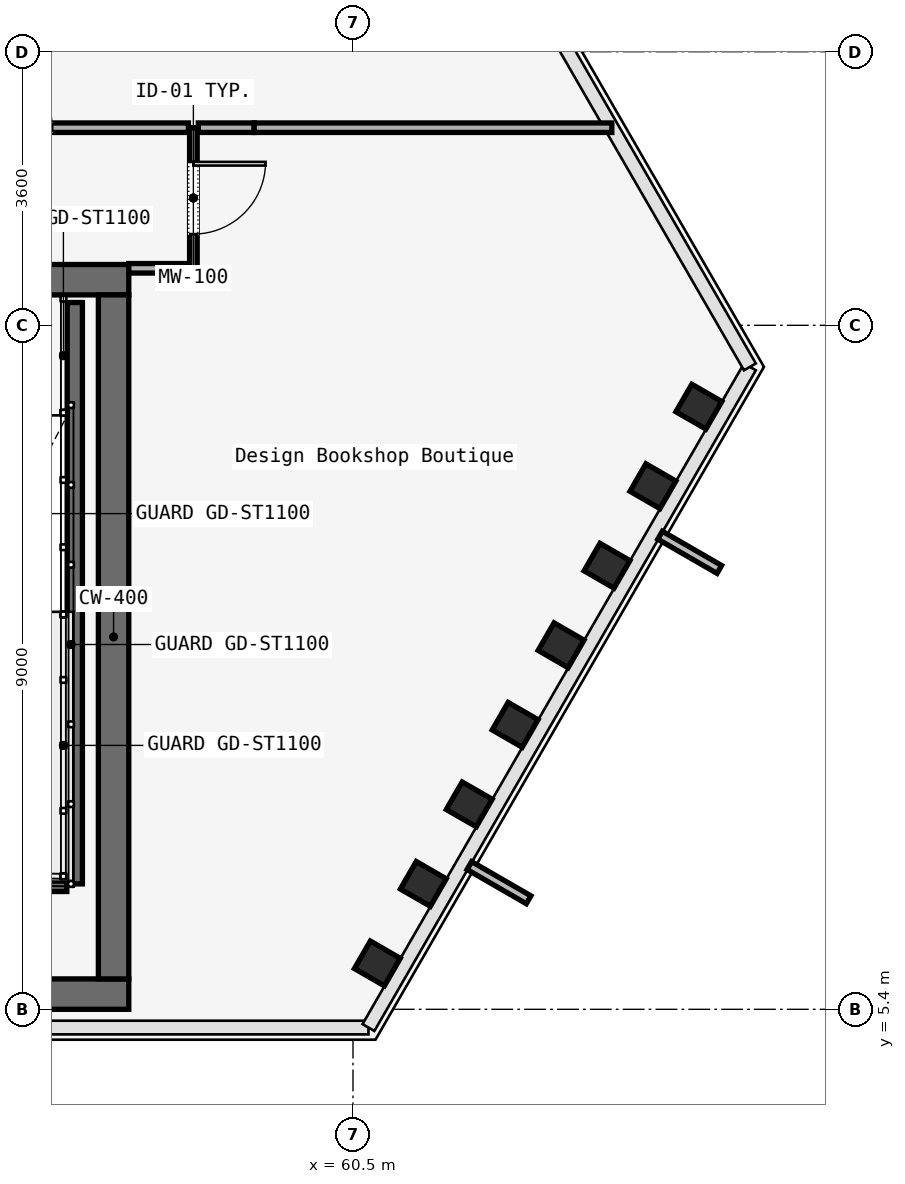
"""IFC4 building model, lengths in metres.
Left out: names, types, materials, properties, quantities, classifications, styles, units other than length and angle.
Written with IfcOpenShell. Run it as: python <this file> out.ifc"""

import sys

from ifc_helpers import new_model, si_unit, direction, frame, frame_2d, origin, origin_2d, place, context, subcontext, project, spatial, rectangle, i_section, extrude, element, fill, save


model = new_model("IFC4")
c1 = context("Model", 3, precision=1e-05, world=origin(), true_north=direction((0.0, 1.0)))
c2 = subcontext(c1, "Body", "Model", "MODEL_VIEW")
j1 = project(units=[si_unit("LENGTHUNIT", "METRE"), si_unit("PLANEANGLEUNIT", "RADIAN")], contexts=[c1])
p1 = place(None, origin())
s1 = spatial("IfcSite", under=j1, at=p1, CompositionType="ELEMENT")
p2 = place(p1, origin())
s2 = spatial("IfcBuilding", under=s1, at=p2, CompositionType="ELEMENT")
p3 = place(p2, frame((0.0, 0.0, 172.6)))
s3 = spatial("IfcBuildingStorey", under=s2, at=p3, CompositionType="ELEMENT", Elevation=172.6)
p4 = place(p3, frame((26.45, 15.0, 0.0), z_axis=(0.0, 0.0, 1.0), x_axis=(1.0, 0.0, 0.0)))
e1 = element("IfcWall", 1, at=p4, inside=s3, PredefinedType="SOLIDWALL", context=c2, shape_type="SweptSolid", body=[
    extrude(rectangle(XDim=31.1, YDim=0.4, at=frame_2d((15.55, 0.0))), origin(), (0.0, 0.0, 1.0), 3.58),
])
p5 = place(p4, frame((1.65, 0.0, 0.0)))
e2 = element("IfcOpeningElement", 2, at=p5, cuts=e1, PredefinedType="OPENING", context=c2, shape_type="SweptSolid", body=[
    extrude(rectangle(XDim=1.1, YDim=2.2, at=frame_2d((0.55, 1.1))), frame((0.0, 0.2, 0.0), z_axis=(0.0, -1.0, 0.0), x_axis=(1.0, 0.0, 0.0)), (0.0, 0.0, 1.0), 0.4),
])
p6 = place(p4, frame((13.65, 0.0, 0.0)))
e3 = element("IfcOpeningElement", 3, at=p6, cuts=e1, PredefinedType="OPENING", context=c2, shape_type="SweptSolid", body=[
    extrude(rectangle(XDim=1.1, YDim=2.2, at=frame_2d((0.55, 1.1))), frame((0.0, 0.2, 0.0), z_axis=(0.0, -1.0, 0.0), x_axis=(1.0, 0.0, 0.0)), (0.0, 0.0, 1.0), 0.4),
])
p7 = place(p4, frame((25.55, 0.0, 0.0)))
e4 = element("IfcOpeningElement", 4, at=p7, cuts=e1, PredefinedType="OPENING", context=c2, shape_type="SweptSolid", body=[
    extrude(rectangle(XDim=1.1, YDim=2.2, at=frame_2d((0.55, 1.1))), frame((0.0, 0.2, 0.0), z_axis=(0.0, -1.0, 0.0), x_axis=(1.0, 0.0, 0.0)), (0.0, 0.0, 1.0), 0.4),
])
p8 = place(p4, frame((10.7, 0.0, 0.0)))
e5 = element("IfcOpeningElement", 5, at=p8, cuts=e1, PredefinedType="OPENING", context=c2, shape_type="SweptSolid", body=[
    extrude(rectangle(XDim=1.4, YDim=2.2, at=frame_2d((0.7, 1.1))), frame((0.0, 0.2, 0.0), z_axis=(0.0, -1.0, 0.0), x_axis=(1.0, 0.0, 0.0)), (0.0, 0.0, 1.0), 0.4),
])
p9 = place(p4, frame((19.35, 0.0, 0.0)))
e6 = element("IfcOpeningElement", 6, at=p9, cuts=e1, PredefinedType="OPENING", context=c2, shape_type="SweptSolid", body=[
    extrude(rectangle(XDim=1.1, YDim=2.2, at=frame_2d((0.55, 1.1))), frame((0.0, 0.2, 0.0), z_axis=(0.0, -1.0, 0.0), x_axis=(1.0, 0.0, 0.0)), (0.0, 0.0, 1.0), 0.4),
])
p10 = place(p4, frame((21.4, 0.0, 0.0)))
e7 = element("IfcOpeningElement", 7, at=p10, cuts=e1, PredefinedType="OPENING", context=c2, shape_type="SweptSolid", body=[
    extrude(rectangle(XDim=0.9, YDim=2.1, at=frame_2d((0.45, 1.05))), frame((0.0, 0.2, 0.0), z_axis=(0.0, -1.0, 0.0), x_axis=(1.0, 0.0, 0.0)), (0.0, 0.0, 1.0), 0.4),
])
p11 = place(p4, frame((23.35, 0.0, 0.0)))
e8 = element("IfcOpeningElement", 8, at=p11, cuts=e1, PredefinedType="OPENING", context=c2, shape_type="SweptSolid", body=[
    extrude(rectangle(XDim=1.3, YDim=2.3, at=frame_2d((0.65, 1.15))), frame((0.0, 0.2, 0.0), z_axis=(0.0, -1.0, 0.0), x_axis=(1.0, 0.0, 0.0)), (0.0, 0.0, 1.0), 0.4),
])
p12 = place(p3, frame((26.45, 5.6, 0.0), z_axis=(0.0, 0.0, 1.0), x_axis=(1.0, 0.0, 0.0)))
e9 = element("IfcWall", 9, at=p12, inside=s3, PredefinedType="SOLIDWALL", context=c2, shape_type="SweptSolid", body=[
    extrude(rectangle(XDim=31.1, YDim=0.4, at=frame_2d((15.55, 0.0))), origin(), (0.0, 0.0, 1.0), 3.58),
])
p13 = place(p3, frame((57.35, 5.8, 0.0), z_axis=(0.0, 0.0, 1.0), x_axis=(0.0, 1.0, 0.0)))
e10 = element("IfcWall", 10, at=p13, inside=s3, PredefinedType="SOLIDWALL", context=c2, shape_type="SweptSolid", body=[
    extrude(rectangle(XDim=9.0, YDim=0.4, at=frame_2d((4.5, 0.0))), origin(), (0.0, 0.0, 1.0), 3.58),
])
for number, where, z_axis, x_axis in (
    (11, (60.821, 6.003, 0.0), (0.0, 0.0, 1.0), (0.5, 0.866, 0.0)),
    (12, (61.425, 7.05, 0.0), (0.0, 0.0, 1.0), (0.5, 0.866, 0.0)),
    (13, (62.029, 8.096, 0.0), (0.0, 0.0, 1.0), (0.5, 0.866, 0.0)),
    (14, (62.634, 9.143, 0.0), (0.0, 0.0, 1.0), (0.5, 0.866, 0.0)),
    (15, (63.238, 10.19, 0.0), (0.0, 0.0, 1.0), (0.5, 0.866, 0.0)),
    (16, (63.842, 11.236, 0.0), (0.0, 0.0, 1.0), (0.5, 0.866, 0.0)),
    (17, (64.446, 12.283, 0.0), (0.0, 0.0, 1.0), (0.5, 0.866, 0.0)),
    (18, (65.051, 13.33, 0.0), (0.0, 0.0, 1.0), (0.5, 0.866, 0.0)),
):
    element("IfcColumn", number, at=place(p3, frame(where, z_axis=z_axis, x_axis=x_axis)), inside=s3, PredefinedType="COLUMN", context=c2, shape_type="SweptSolid", body=[
        extrude(i_section(OverallWidth=0.418, OverallDepth=0.455, WebThickness=0.042, FlangeThickness=0.052, FilletRadius=0.015, at=origin_2d()), origin(), (0.0, 0.0, 1.0), 3.58),
    ])
p14 = place(p3, frame((56.84, 14.7, 0.0), z_axis=(0.0, 0.0, 1.0), x_axis=(0.0, -1.0, 0.0)))
e19 = element("IfcWall", 19, at=p14, inside=s3, PredefinedType="SOLIDWALL", context=c2, shape_type="SweptSolid", body=[
    extrude(rectangle(XDim=7.65, YDim=0.2, at=frame_2d((3.825, 0.0))), origin(), (0.0, 0.0, 1.0), 3.8),
])
p15 = place(p3, frame((53.62, 7.05, 0.0), z_axis=(0.0, 0.0, 1.0), x_axis=(1.0, 0.0, 0.0)))
e20 = element("IfcWall", 20, at=p15, inside=s3, PredefinedType="SOLIDWALL", context=c2, shape_type="SweptSolid", body=[
    extrude(rectangle(XDim=3.115, YDim=0.2, at=frame_2d((1.558, 0.0))), origin(), (0.0, 0.0, 1.0), 3.8),
])
p16 = place(p3, frame((58.4, 17.0, 0.0), z_axis=(0.0, 0.0, 1.0), x_axis=(0.0, -1.0, 0.0)))
e21 = element("IfcWall", 21, at=p16, inside=s3, PredefinedType="MOVABLE", context=c2, shape_type="SweptSolid", body=[
    extrude(rectangle(XDim=1.85, YDim=0.1, at=frame_2d((0.925, 0.0))), origin(), (0.0, 0.0, 1.0), 3.01),
])
p17 = place(p16, frame((0.45, 0.0, 0.0)))
e22 = element("IfcOpeningElement", 22, at=p17, cuts=e21, PredefinedType="OPENING", context=c2, shape_type="SweptSolid", body=[
    extrude(rectangle(XDim=0.95, YDim=2.2, at=frame_2d((0.475, 1.1))), frame((0.0, 0.05, 0.0), z_axis=(0.0, -1.0, 0.0), x_axis=(1.0, 0.0, 0.0)), (0.0, 0.0, 1.0), 0.1),
])
p18 = place(p3, frame((58.335, 15.15, 0.0), z_axis=(0.0, 0.0, 1.0), x_axis=(-1.0, 0.0, 0.0)))
e23 = element("IfcWall", 23, at=p18, inside=s3, PredefinedType="PARTITIONING", context=c2, shape_type="SweptSolid", body=[
    extrude(rectangle(XDim=0.785, YDim=0.125, at=frame_2d((0.393, 0.0))), origin(), (0.0, 0.0, 1.0), 3.01),
])
p19 = place(p3, frame((53.8, 17.0, 0.0), z_axis=(0.0, 0.0, 1.0), x_axis=(1.0, 0.0, 0.0)))
e24 = element("IfcWall", 24, at=p19, inside=s3, PredefinedType="PARTITIONING", context=c2, shape_type="SweptSolid", body=[
    extrude(rectangle(XDim=4.535, YDim=0.125, at=frame_2d((2.268, 0.0))), origin(), (0.0, 0.0, 1.0), 3.01),
])
p20 = place(p19, frame((1.792, 0.0, 0.0)))
e25 = element("IfcOpeningElement", 25, at=p20, cuts=e24, PredefinedType="OPENING", context=c2, shape_type="SweptSolid", body=[
    extrude(rectangle(XDim=0.95, YDim=2.2, at=frame_2d((0.475, 1.1))), frame((0.0, 0.062, 0.0), z_axis=(0.0, -1.0, 0.0), x_axis=(1.0, 0.0, 0.0)), (0.0, 0.0, 1.0), 0.125),
])
p21 = place(p3, frame((58.465, 17.0, 0.0), z_axis=(0.0, 0.0, 1.0), x_axis=(1.0, 0.0, 0.0)))
e26 = element("IfcWall", 26, at=p21, inside=s3, PredefinedType="PARTITIONING", context=c2, shape_type="SweptSolid", body=[
    extrude(rectangle(XDim=0.735, YDim=0.125, at=frame_2d((0.367, 0.0))), origin(), (0.0, 0.0, 1.0), 3.01),
])
p22 = place(p3, frame((59.2, 17.0, 0.0), z_axis=(0.0, 0.0, 1.0), x_axis=(1.0, 0.0, 0.0)))
e27 = element("IfcWall", 27, at=p22, inside=s3, PredefinedType="PARTITIONING", context=c2, shape_type="SweptSolid", body=[
    extrude(rectangle(XDim=4.705, YDim=0.125, at=frame_2d((2.353, 0.0))), origin(), (0.0, 0.0, 1.0), 3.01),
])
p23 = place(p17, origin())
e28 = element("IfcDoor", 28, at=p23, inside=s3, OperationType="SINGLE_SWING_LEFT", PredefinedType="DOOR", context=c2, shape_type="SweptSolid", body=[
    extrude(rectangle(XDim=0.95, YDim=2.2, at=frame_2d((0.475, 1.1))), frame((0.0, 0.025, 0.0), z_axis=(0.0, -1.0, 0.0), x_axis=(1.0, 0.0, 0.0)), (0.0, 0.0, 1.0), 0.05),
])
fill(e22, e28)
save(model, sys.argv[1])
